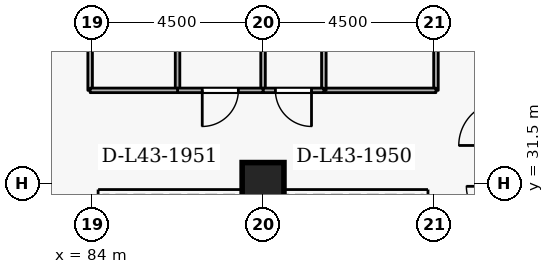
"""IFC4 building model, lengths in metres.
Left out: names, types, materials, properties, quantities, classifications, styles, units other than length and angle.
Written with IfcOpenShell. Run it as: python <this file> out.ifc"""

import sys

from ifc_helpers import new_model, si_unit, direction, frame, frame_2d, origin, origin_2d, place, context, subcontext, project, spatial, rectangle, extrude, element, fill, save


model = new_model("IFC4")
c1 = context("Model", 3, precision=1e-05, world=origin(), true_north=direction((0.0, 1.0)))
c2 = subcontext(c1, "Body", "Model", "MODEL_VIEW")
j1 = project(units=[si_unit("LENGTHUNIT", "METRE"), si_unit("PLANEANGLEUNIT", "RADIAN")], contexts=[c1])
p1 = place(None, origin())
s1 = spatial("IfcSite", under=j1, at=p1, CompositionType="ELEMENT")
p2 = place(p1, origin())
s2 = spatial("IfcBuilding", under=s1, at=p2, CompositionType="ELEMENT")
p3 = place(p2, frame((0.0, 0.0, 163.5)))
s3 = spatial("IfcBuildingStorey", under=s2, at=p3, CompositionType="ELEMENT", Elevation=163.5)
p4 = place(p3, frame((88.5, 31.5, 0.0), z_axis=(0.0, 0.0, 1.0), x_axis=(1.0, 0.0, 0.0)))
e1 = element("IfcColumn", 1, at=p4, inside=s3, PredefinedType="COLUMN", context=c2, shape_type="SweptSolid", body=[
    extrude(rectangle(XDim=1.1, YDim=1.1, at=origin_2d()), origin(), (0.0, 0.0, 1.0), 3.6),
])
p5 = place(p3, frame((93.05, 39.25, 0.0), z_axis=(0.0, 0.0, 1.0), x_axis=(0.0, -1.0, 0.0)))
e2 = element("IfcWall", 2, at=p5, inside=s3, PredefinedType="PARTITIONING", context=c2, shape_type="SweptSolid", body=[
    extrude(rectangle(XDim=5.3, YDim=0.12, at=frame_2d((2.65, 0.0))), origin(), (0.0, 0.0, 1.0), 3.34),
])
p6 = place(p5, frame((2.125, 0.0, 0.0)))
e3 = element("IfcOpeningElement", 3, at=p6, cuts=e2, PredefinedType="OPENING", context=c2, shape_type="SweptSolid", body=[
    extrude(rectangle(XDim=1.05, YDim=2.1, at=frame_2d((0.525, 1.05))), frame((0.0, 0.07, 0.0), z_axis=(0.0, -1.0, 0.0), x_axis=(1.0, 0.0, 0.0)), (0.0, 0.0, 1.0), 0.14),
])
p7 = place(p3, frame((93.05, 33.95, 0.0), z_axis=(0.0, 0.0, 1.0), x_axis=(-1.0, 0.0, 0.0)))
e4 = element("IfcWall", 4, at=p7, inside=s3, PredefinedType="PARTITIONING", context=c2, shape_type="SweptSolid", body=[
    extrude(rectangle(XDim=2.95, YDim=0.12, at=frame_2d((1.475, 0.0))), origin(), (0.0, 0.0, 1.0), 3.34),
])
p8 = place(p3, frame((90.1, 33.95, 0.0), z_axis=(0.0, 0.0, 1.0), x_axis=(0.0, 1.0, 0.0)))
e5 = element("IfcWall", 5, at=p8, inside=s3, PredefinedType="PARTITIONING", context=c2, shape_type="SweptSolid", body=[
    extrude(rectangle(XDim=16.77, YDim=0.12, at=frame_2d((8.385, 0.0))), origin(), (0.0, 0.0, 1.0), 3.34),
])
p9 = place(p3, frame((88.5, 33.95, 0.0), z_axis=(0.0, 0.0, 1.0), x_axis=(0.0, 1.0, 0.0)))
e6 = element("IfcWall", 6, at=p9, inside=s3, PredefinedType="PARTITIONING", context=c2, shape_type="SweptSolid", body=[
    extrude(rectangle(XDim=16.77, YDim=0.12, at=frame_2d((8.385, 0.0))), origin(), (0.0, 0.0, 1.0), 2.878),
])
p10 = place(p3, frame((90.1, 33.95, 0.0), z_axis=(0.0, 0.0, 1.0), x_axis=(-1.0, 0.0, 0.0)))
e7 = element("IfcWall", 7, at=p10, inside=s3, PredefinedType="PARTITIONING", context=c2, shape_type="SweptSolid", body=[
    extrude(rectangle(XDim=1.6, YDim=0.12, at=frame_2d((0.8, 0.0))), origin(), (0.0, 0.0, 1.0), 3.34),
])
p11 = place(p10, frame((0.325, 0.0, 0.0)))
e8 = element("IfcOpeningElement", 8, at=p11, cuts=e7, PredefinedType="OPENING", context=c2, shape_type="SweptSolid", body=[
    extrude(rectangle(XDim=0.95, YDim=2.1, at=frame_2d((0.475, 1.05))), frame((0.0, 0.07, 0.0), z_axis=(0.0, -1.0, 0.0), x_axis=(1.0, 0.0, 0.0)), (0.0, 0.0, 1.0), 0.14),
])
p12 = place(p3, frame((86.25, 33.95, 0.0), z_axis=(0.0, 0.0, 1.0), x_axis=(0.0, 1.0, 0.0)))
e9 = element("IfcWall", 9, at=p12, inside=s3, PredefinedType="PARTITIONING", context=c2, shape_type="SweptSolid", body=[
    extrude(rectangle(XDim=16.77, YDim=0.12, at=frame_2d((8.385, 0.0))), origin(), (0.0, 0.0, 1.0), 3.34),
])
p13 = place(p3, frame((88.5, 33.95, 0.0), z_axis=(0.0, 0.0, 1.0), x_axis=(-1.0, 0.0, 0.0)))
e10 = element("IfcWall", 10, at=p13, inside=s3, PredefinedType="PARTITIONING", context=c2, shape_type="SweptSolid", body=[
    extrude(rectangle(XDim=2.25, YDim=0.12, at=frame_2d((1.125, 0.0))), origin(), (0.0, 0.0, 1.0), 3.34),
])
p14 = place(p13, frame((0.65, 0.0, 0.0)))
e11 = element("IfcOpeningElement", 11, at=p14, cuts=e10, PredefinedType="OPENING", context=c2, shape_type="SweptSolid", body=[
    extrude(rectangle(XDim=0.95, YDim=2.1, at=frame_2d((0.475, 1.05))), frame((0.0, 0.07, 0.0), z_axis=(0.0, -1.0, 0.0), x_axis=(1.0, 0.0, 0.0)), (0.0, 0.0, 1.0), 0.14),
])
p15 = place(p3, frame((83.95, 33.95, 0.0), z_axis=(0.0, 0.0, 1.0), x_axis=(0.0, 1.0, 0.0)))
e12 = element("IfcWall", 12, at=p15, inside=s3, PredefinedType="PARTITIONING", context=c2, shape_type="SweptSolid", body=[
    extrude(rectangle(XDim=3.35, YDim=0.12, at=frame_2d((1.675, 0.0))), origin(), (0.0, 0.0, 1.0), 3.34),
])
p16 = place(p15, frame((1.15, 0.0, 0.0)))
e13 = element("IfcOpeningElement", 13, at=p16, cuts=e12, PredefinedType="OPENING", context=c2, shape_type="SweptSolid", body=[
    extrude(rectangle(XDim=1.05, YDim=2.1, at=frame_2d((0.525, 1.05))), frame((0.0, 0.07, 0.0), z_axis=(0.0, -1.0, 0.0), x_axis=(1.0, 0.0, 0.0)), (0.0, 0.0, 1.0), 0.14),
])
p17 = place(p3, frame((86.25, 33.95, 0.0), z_axis=(0.0, 0.0, 1.0), x_axis=(-1.0, 0.0, 0.0)))
e14 = element("IfcWall", 14, at=p17, inside=s3, PredefinedType="PARTITIONING", context=c2, shape_type="SweptSolid", body=[
    extrude(rectangle(XDim=2.3, YDim=0.12, at=frame_2d((1.15, 0.0))), origin(), (0.0, 0.0, 1.0), 3.34),
])
p18 = place(p11, origin())
e15 = element("IfcDoor", 15, at=p18, inside=s3, OperationType="SINGLE_SWING_LEFT", PredefinedType="DOOR", context=c2, shape_type="SweptSolid", body=[
    extrude(rectangle(XDim=0.95, YDim=2.1, at=frame_2d((0.475, 1.05))), frame((0.0, 0.025, 0.0), z_axis=(0.0, -1.0, 0.0), x_axis=(1.0, 0.0, 0.0)), (0.0, 0.0, 1.0), 0.05),
])
fill(e8, e15)
p19 = place(p14, origin())
e16 = element("IfcDoor", 16, at=p19, inside=s3, OperationType="SINGLE_SWING_RIGHT", PredefinedType="DOOR", context=c2, shape_type="SweptSolid", body=[
    extrude(rectangle(XDim=0.95, YDim=2.1, at=frame_2d((0.475, 1.05))), frame((0.0, 0.025, 0.0), z_axis=(0.0, -1.0, 0.0), x_axis=(1.0, 0.0, 0.0)), (0.0, 0.0, 1.0), 0.05),
])
fill(e11, e16)
save(model, sys.argv[1])
